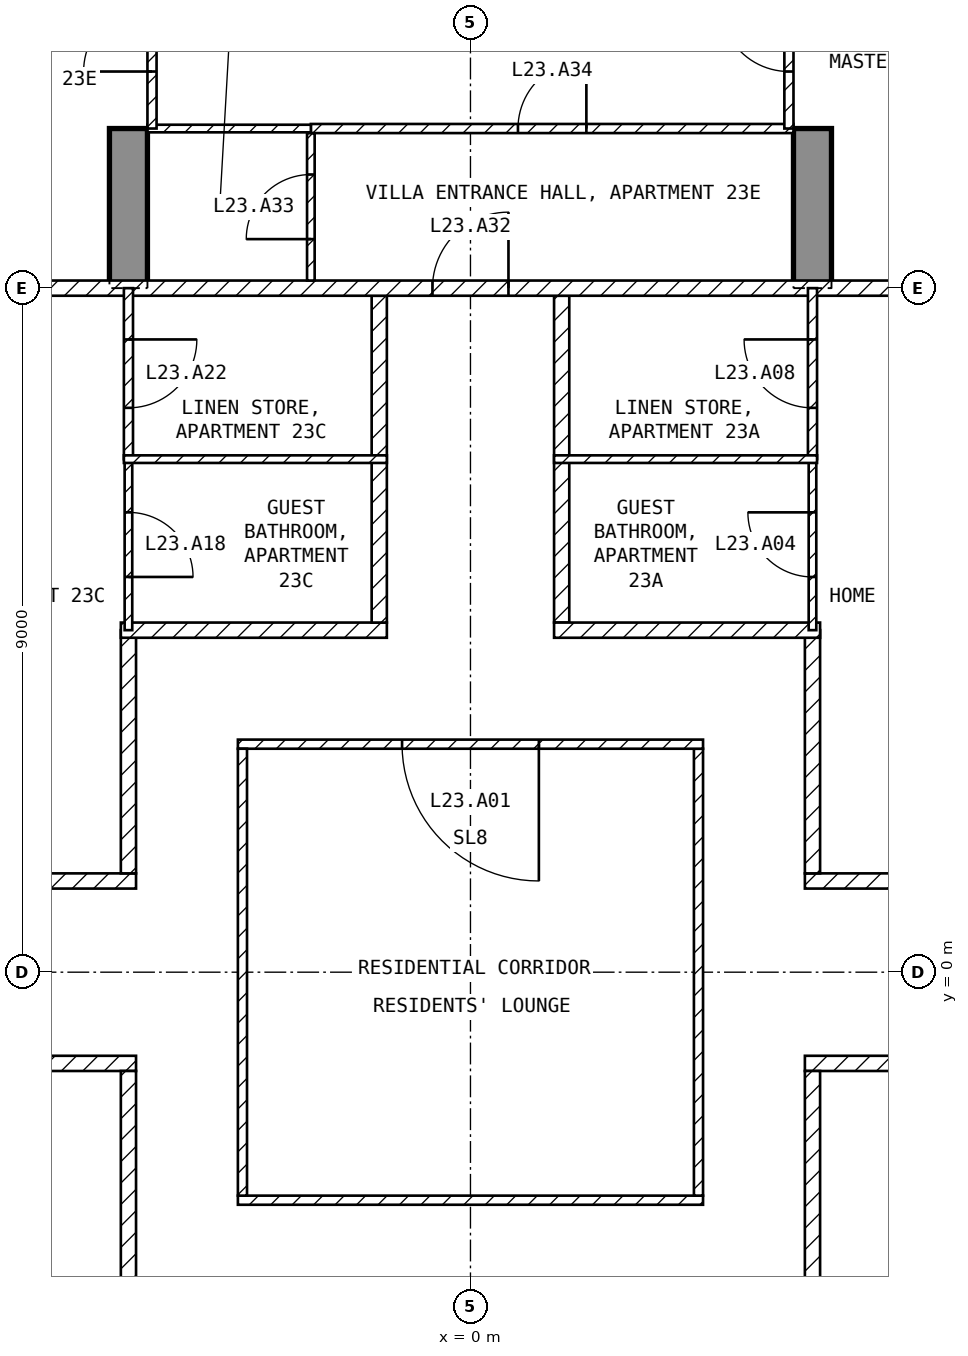
"""IFC4 building model, lengths in metres.
Left out: names, types, materials, properties, quantities, classifications, styles, units other than length and angle.
Written with IfcOpenShell. Run it as: python <this file> out.ifc"""

import sys

from ifc_helpers import new_model, si_unit, direction, frame, frame_2d, origin, place, context, subcontext, project, spatial, polyline, rectangle, outline, extrude, element, fill, save


model = new_model("IFC4")
c1 = context("Model", 3, precision=1e-05, world=origin(), true_north=direction((0.0, 1.0)))
c2 = subcontext(c1, "Body", "Model", "MODEL_VIEW")
j1 = project(units=[si_unit("LENGTHUNIT", "METRE"), si_unit("PLANEANGLEUNIT", "RADIAN")], contexts=[c1])
p1 = place(None, origin())
s1 = spatial("IfcSite", under=j1, at=p1, CompositionType="ELEMENT")
p2 = place(p1, origin())
s2 = spatial("IfcBuilding", under=s1, at=p2, CompositionType="ELEMENT")
p3 = place(p2, frame((0.0, 0.0, 102.4)))
s3 = spatial("IfcBuildingStorey", under=s2, at=p3, CompositionType="ELEMENT", Elevation=102.4)
for number, where, z_axis, x_axis in (
    (1, (-4.75, 9.0, -0.25), (1.0, 0.0, 0.0), (0.0, 1.0, 0.0)),
    (2, (4.25, 9.0, -0.25), (1.0, 0.0, 0.0), (0.0, 1.0, 0.0)),
):
    element("IfcWall", number, at=place(p3, frame(where, z_axis=z_axis, x_axis=x_axis)), inside=s3, PredefinedType="SHEAR", context=c2, shape_type="SweptSolid", body=[
        extrude(outline(polyline([(0.0, 0.0), (2.1, 0.0), (2.1, 2.65), (4.5, 2.65), (4.5, 0.0), (9.9, 0.0), (9.9, 2.65), (12.3, 2.65), (12.3, 0.0), (16.55, 0.0), (16.55, 3.5), (0.0, 3.5), (0.0, 0.0)])), origin(), (0.0, 0.0, 1.0), 0.5),
    ])
p4 = place(p3, frame((-3.06, -3.0, 0.0), z_axis=(0.0, 0.0, 1.0), x_axis=(1.0, 0.0, 0.0)))
e3 = element("IfcWall", 3, at=p4, inside=s3, PredefinedType="PARTITIONING", context=c2, shape_type="SweptSolid", body=[
    extrude(rectangle(XDim=6.12, YDim=0.12, at=frame_2d((3.06, 0.0))), origin(), (0.0, 0.0, 1.0), 3.25),
])
p5 = place(p3, frame((3.0, -2.94, 0.0), z_axis=(0.0, 0.0, 1.0), x_axis=(0.0, 1.0, 0.0)))
e4 = element("IfcWall", 4, at=p5, inside=s3, PredefinedType="PARTITIONING", context=c2, shape_type="SweptSolid", body=[
    extrude(rectangle(XDim=5.88, YDim=0.12, at=frame_2d((2.94, 0.0))), origin(), (0.0, 0.0, 1.0), 3.25),
])
p6 = place(p3, frame((3.06, 3.0, 0.0), z_axis=(0.0, 0.0, 1.0), x_axis=(-1.0, 0.0, 0.0)))
e5 = element("IfcWall", 5, at=p6, inside=s3, PredefinedType="PARTITIONING", context=c2, shape_type="SweptSolid", body=[
    extrude(rectangle(XDim=6.12, YDim=0.12, at=frame_2d((3.06, 0.0))), origin(), (0.0, 0.0, 1.0), 3.25),
])
p7 = place(p6, frame((2.16, 0.0, 0.0)))
e6 = element("IfcOpeningElement", 6, at=p7, cuts=e5, PredefinedType="OPENING", context=c2, shape_type="SweptSolid", body=[
    extrude(rectangle(XDim=1.8, YDim=2.1, at=frame_2d((0.9, 1.05))), frame((0.0, 0.07, 0.0), z_axis=(0.0, -1.0, 0.0), x_axis=(1.0, 0.0, 0.0)), (0.0, 0.0, 1.0), 0.14),
])
p8 = place(p3, frame((-3.0, 2.94, 0.0), z_axis=(0.0, 0.0, 1.0), x_axis=(0.0, -1.0, 0.0)))
e7 = element("IfcWall", 7, at=p8, inside=s3, PredefinedType="PARTITIONING", context=c2, shape_type="SweptSolid", body=[
    extrude(rectangle(XDim=5.88, YDim=0.12, at=frame_2d((2.94, 0.0))), origin(), (0.0, 0.0, 1.0), 3.25),
])
p9 = place(p3, frame((4.4, 1.2, 0.0), z_axis=(0.0, 0.0, 1.0), x_axis=(1.0, 0.0, 0.0)))
e8 = element("IfcWall", 8, at=p9, inside=s3, PredefinedType="PARTITIONING", context=c2, shape_type="SweptSolid", body=[
    extrude(rectangle(XDim=17.2, YDim=0.2, at=frame_2d((8.6, 0.0))), origin(), (0.0, 0.0, 1.0), 3.25),
])
p10 = place(p9, frame((5.9, 0.0, 0.0)))
e9 = element("IfcOpeningElement", 9, at=p10, cuts=e8, PredefinedType="OPENING", context=c2, shape_type="SweptSolid", body=[
    extrude(rectangle(XDim=1.0, YDim=2.1, at=frame_2d((0.5, 1.05))), frame((0.0, 0.11, 0.0), z_axis=(0.0, -1.0, 0.0), x_axis=(1.0, 0.0, 0.0)), (0.0, 0.0, 1.0), 0.22),
])
p11 = place(p3, frame((4.5, 4.5, 0.0), z_axis=(0.0, 0.0, 1.0), x_axis=(0.0, -1.0, 0.0)))
e10 = element("IfcWall", 10, at=p11, inside=s3, PredefinedType="PARTITIONING", context=c2, shape_type="SweptSolid", body=[
    extrude(rectangle(XDim=3.2, YDim=0.2, at=frame_2d((1.6, 0.0))), origin(), (0.0, 0.0, 1.0), 3.25),
])
p12 = place(p3, frame((1.2, 8.9, 0.0), z_axis=(0.0, 0.0, 1.0), x_axis=(0.0, -1.0, 0.0)))
e11 = element("IfcWall", 11, at=p12, inside=s3, PredefinedType="PARTITIONING", context=c2, shape_type="SweptSolid", body=[
    extrude(rectangle(XDim=4.3, YDim=0.2, at=frame_2d((2.15, 0.0))), origin(), (0.0, 0.0, 1.0), 3.25),
])
p13 = place(p3, frame((1.1, 4.5, 0.0), z_axis=(0.0, 0.0, 1.0), x_axis=(1.0, 0.0, 0.0)))
e12 = element("IfcWall", 12, at=p13, inside=s3, PredefinedType="PARTITIONING", context=c2, shape_type="SweptSolid", body=[
    extrude(rectangle(XDim=3.5, YDim=0.2, at=frame_2d((1.75, 0.0))), origin(), (0.0, 0.0, 1.0), 3.25),
])
p14 = place(p3, frame((21.6, -1.2, 0.0), z_axis=(0.0, 0.0, 1.0), x_axis=(-1.0, 0.0, 0.0)))
e13 = element("IfcWall", 13, at=p14, inside=s3, PredefinedType="PARTITIONING", context=c2, shape_type="SweptSolid", body=[
    extrude(rectangle(XDim=17.2, YDim=0.2, at=frame_2d((8.6, 0.0))), origin(), (0.0, 0.0, 1.0), 3.25),
])
p15 = place(p14, frame((3.85, 0.0, 0.0)))
e14 = element("IfcOpeningElement", 14, at=p15, cuts=e13, PredefinedType="OPENING", context=c2, shape_type="SweptSolid", body=[
    extrude(rectangle(XDim=1.0, YDim=2.1, at=frame_2d((0.5, 1.05))), frame((0.0, 0.11, 0.0), z_axis=(0.0, -1.0, 0.0), x_axis=(1.0, 0.0, 0.0)), (0.0, 0.0, 1.0), 0.22),
])
p16 = place(p3, frame((4.5, -1.3, 0.0), z_axis=(0.0, 0.0, 1.0), x_axis=(0.0, -1.0, 0.0)))
e15 = element("IfcWall", 15, at=p16, inside=s3, PredefinedType="PARTITIONING", context=c2, shape_type="SweptSolid", body=[
    extrude(rectangle(XDim=3.2, YDim=0.2, at=frame_2d((1.6, 0.0))), origin(), (0.0, 0.0, 1.0), 3.25),
])
p17 = place(p3, frame((-21.6, 1.2, 0.0), z_axis=(0.0, 0.0, 1.0), x_axis=(1.0, 0.0, 0.0)))
e16 = element("IfcWall", 16, at=p17, inside=s3, PredefinedType="PARTITIONING", context=c2, shape_type="SweptSolid", body=[
    extrude(rectangle(XDim=17.2, YDim=0.2, at=frame_2d((8.6, 0.0))), origin(), (0.0, 0.0, 1.0), 3.25),
])
p18 = place(p17, frame((6.1, 0.0, 0.0)))
e17 = element("IfcOpeningElement", 17, at=p18, cuts=e16, PredefinedType="OPENING", context=c2, shape_type="SweptSolid", body=[
    extrude(rectangle(XDim=1.0, YDim=2.1, at=frame_2d((0.5, 1.05))), frame((0.0, 0.11, 0.0), z_axis=(0.0, -1.0, 0.0), x_axis=(1.0, 0.0, 0.0)), (0.0, 0.0, 1.0), 0.22),
])
p19 = place(p3, frame((-4.5, 1.3, 0.0), z_axis=(0.0, 0.0, 1.0), x_axis=(0.0, 1.0, 0.0)))
e18 = element("IfcWall", 18, at=p19, inside=s3, PredefinedType="PARTITIONING", context=c2, shape_type="SweptSolid", body=[
    extrude(rectangle(XDim=3.2, YDim=0.2, at=frame_2d((1.6, 0.0))), origin(), (0.0, 0.0, 1.0), 3.25),
])
p20 = place(p3, frame((-4.6, 4.5, 0.0), z_axis=(0.0, 0.0, 1.0), x_axis=(1.0, 0.0, 0.0)))
e19 = element("IfcWall", 19, at=p20, inside=s3, PredefinedType="PARTITIONING", context=c2, shape_type="SweptSolid", body=[
    extrude(rectangle(XDim=3.5, YDim=0.2, at=frame_2d((1.75, 0.0))), origin(), (0.0, 0.0, 1.0), 3.25),
])
p21 = place(p3, frame((-1.2, 4.6, 0.0), z_axis=(0.0, 0.0, 1.0), x_axis=(0.0, 1.0, 0.0)))
e20 = element("IfcWall", 20, at=p21, inside=s3, PredefinedType="PARTITIONING", context=c2, shape_type="SweptSolid", body=[
    extrude(rectangle(XDim=4.3, YDim=0.2, at=frame_2d((2.15, 0.0))), origin(), (0.0, 0.0, 1.0), 3.25),
])
p22 = place(p3, frame((-4.4, -1.2, 0.0), z_axis=(0.0, 0.0, 1.0), x_axis=(-1.0, 0.0, 0.0)))
e21 = element("IfcWall", 21, at=p22, inside=s3, PredefinedType="PARTITIONING", context=c2, shape_type="SweptSolid", body=[
    extrude(rectangle(XDim=17.2, YDim=0.2, at=frame_2d((8.6, 0.0))), origin(), (0.0, 0.0, 1.0), 3.25),
])
p23 = place(p22, frame((8.3, 0.0, 0.0)))
e22 = element("IfcOpeningElement", 22, at=p23, cuts=e21, PredefinedType="OPENING", context=c2, shape_type="SweptSolid", body=[
    extrude(rectangle(XDim=1.0, YDim=2.1, at=frame_2d((0.5, 1.05))), frame((0.0, 0.11, 0.0), z_axis=(0.0, -1.0, 0.0), x_axis=(1.0, 0.0, 0.0)), (0.0, 0.0, 1.0), 0.22),
])
p24 = place(p3, frame((-4.5, -4.5, 0.0), z_axis=(0.0, 0.0, 1.0), x_axis=(0.0, 1.0, 0.0)))
e23 = element("IfcWall", 23, at=p24, inside=s3, PredefinedType="PARTITIONING", context=c2, shape_type="SweptSolid", body=[
    extrude(rectangle(XDim=3.2, YDim=0.2, at=frame_2d((1.6, 0.0))), origin(), (0.0, 0.0, 1.0), 3.25),
])
p25 = place(p3, frame((-8.92, 9.0, 0.0), z_axis=(0.0, 0.0, 1.0), x_axis=(1.0, 0.0, 0.0)))
e24 = element("IfcWall", 24, at=p25, inside=s3, PredefinedType="PARTITIONING", context=c2, shape_type="SweptSolid", body=[
    extrude(rectangle(XDim=17.84, YDim=0.2, at=frame_2d((8.92, 0.0))), origin(), (0.0, 0.0, 1.0), 3.25),
])
p26 = place(p25, frame((8.42, 0.0, 0.0)))
e25 = element("IfcOpeningElement", 25, at=p26, cuts=e24, PredefinedType="OPENING", context=c2, shape_type="SweptSolid", body=[
    extrude(rectangle(XDim=1.0, YDim=2.1, at=frame_2d((0.5, 1.05))), frame((0.0, 0.11, 0.0), z_axis=(0.0, -1.0, 0.0), x_axis=(1.0, 0.0, 0.0)), (0.0, 0.0, 1.0), 0.22),
])
p27 = place(p3, frame((4.5, 4.5, 0.0), z_axis=(0.0, 0.0, 1.0), x_axis=(0.0, 1.0, 0.0)))
e26 = element("IfcWall", 26, at=p27, inside=s3, PredefinedType="PARTITIONING", context=c2, shape_type="SweptSolid", body=[
    extrude(rectangle(XDim=2.25, YDim=0.1, at=frame_2d((1.125, 0.0))), origin(), (0.0, 0.0, 1.0), 3.25),
])
p28 = place(p27, frame((0.7, 0.0, 0.0)))
e27 = element("IfcOpeningElement", 27, at=p28, cuts=e26, PredefinedType="OPENING", context=c2, shape_type="SweptSolid", body=[
    extrude(rectangle(XDim=0.85, YDim=2.1, at=frame_2d((0.425, 1.05))), frame((0.0, 0.06, 0.0), z_axis=(0.0, -1.0, 0.0), x_axis=(1.0, 0.0, 0.0)), (0.0, 0.0, 1.0), 0.12),
])
p29 = place(p3, frame((4.5, 6.75, 0.0), z_axis=(0.0, 0.0, 1.0), x_axis=(0.0, 1.0, 0.0)))
e28 = element("IfcWall", 28, at=p29, inside=s3, PredefinedType="PARTITIONING", context=c2, shape_type="SweptSolid", body=[
    extrude(rectangle(XDim=2.25, YDim=0.12, at=frame_2d((1.125, 0.0))), origin(), (0.0, 0.0, 1.0), 3.25),
])
p30 = place(p29, frame((0.675, 0.0, 0.0)))
e29 = element("IfcOpeningElement", 29, at=p30, cuts=e28, PredefinedType="OPENING", context=c2, shape_type="SweptSolid", body=[
    extrude(rectangle(XDim=0.9, YDim=2.1, at=frame_2d((0.45, 1.05))), frame((0.0, 0.07, 0.0), z_axis=(0.0, -1.0, 0.0), x_axis=(1.0, 0.0, 0.0)), (0.0, 0.0, 1.0), 0.14),
])
p31 = place(p3, frame((1.1, 6.75, 0.0), z_axis=(0.0, 0.0, 1.0), x_axis=(1.0, 0.0, 0.0)))
e30 = element("IfcWall", 30, at=p31, inside=s3, PredefinedType="PARTITIONING", context=c2, shape_type="SweptSolid", body=[
    extrude(rectangle(XDim=3.46, YDim=0.1, at=frame_2d((1.73, 0.0))), origin(), (0.0, 0.0, 1.0), 3.25),
])
p32 = place(p3, frame((-4.5, 6.75, 0.0), z_axis=(0.0, 0.0, 1.0), x_axis=(0.0, -1.0, 0.0)))
e31 = element("IfcWall", 31, at=p32, inside=s3, PredefinedType="PARTITIONING", context=c2, shape_type="SweptSolid", body=[
    extrude(rectangle(XDim=2.25, YDim=0.1, at=frame_2d((1.125, 0.0))), origin(), (0.0, 0.0, 1.0), 3.25),
])
p33 = place(p32, frame((0.7, 0.0, 0.0)))
e32 = element("IfcOpeningElement", 32, at=p33, cuts=e31, PredefinedType="OPENING", context=c2, shape_type="SweptSolid", body=[
    extrude(rectangle(XDim=0.85, YDim=2.1, at=frame_2d((0.425, 1.05))), frame((0.0, 0.06, 0.0), z_axis=(0.0, -1.0, 0.0), x_axis=(1.0, 0.0, 0.0)), (0.0, 0.0, 1.0), 0.12),
])
p34 = place(p3, frame((-4.5, 9.0, 0.0), z_axis=(0.0, 0.0, 1.0), x_axis=(0.0, -1.0, 0.0)))
e33 = element("IfcWall", 33, at=p34, inside=s3, PredefinedType="PARTITIONING", context=c2, shape_type="SweptSolid", body=[
    extrude(rectangle(XDim=2.25, YDim=0.12, at=frame_2d((1.125, 0.0))), origin(), (0.0, 0.0, 1.0), 3.25),
])
p35 = place(p34, frame((0.675, 0.0, 0.0)))
e34 = element("IfcOpeningElement", 34, at=p35, cuts=e33, PredefinedType="OPENING", context=c2, shape_type="SweptSolid", body=[
    extrude(rectangle(XDim=0.9, YDim=2.1, at=frame_2d((0.45, 1.05))), frame((0.0, 0.07, 0.0), z_axis=(0.0, -1.0, 0.0), x_axis=(1.0, 0.0, 0.0)), (0.0, 0.0, 1.0), 0.14),
])
p36 = place(p3, frame((-4.56, 6.75, 0.0), z_axis=(0.0, 0.0, 1.0), x_axis=(1.0, 0.0, 0.0)))
e35 = element("IfcWall", 35, at=p36, inside=s3, PredefinedType="PARTITIONING", context=c2, shape_type="SweptSolid", body=[
    extrude(rectangle(XDim=3.46, YDim=0.1, at=frame_2d((1.73, 0.0))), origin(), (0.0, 0.0, 1.0), 3.25),
])
p37 = place(p3, frame((-2.1, 9.1, 0.0), z_axis=(0.0, 0.0, 1.0), x_axis=(0.0, 1.0, 0.0)))
e36 = element("IfcWall", 36, at=p37, inside=s3, PredefinedType="PARTITIONING", context=c2, shape_type="SweptSolid", body=[
    extrude(rectangle(XDim=1.94, YDim=0.1, at=frame_2d((0.97, 0.0))), origin(), (0.0, 0.0, 1.0), 3.25),
])
p38 = place(p37, frame((0.545, 0.0, 0.0)))
e37 = element("IfcOpeningElement", 37, at=p38, cuts=e36, PredefinedType="OPENING", context=c2, shape_type="SweptSolid", body=[
    extrude(rectangle(XDim=0.85, YDim=2.1, at=frame_2d((0.425, 1.05))), frame((0.0, 0.06, 0.0), z_axis=(0.0, -1.0, 0.0), x_axis=(1.0, 0.0, 0.0)), (0.0, 0.0, 1.0), 0.12),
])
p39 = place(p3, frame((-2.1, 11.1, 0.0), z_axis=(0.0, 0.0, 1.0), x_axis=(1.0, 0.0, 0.0)))
e38 = element("IfcWall", 38, at=p39, inside=s3, PredefinedType="PARTITIONING", context=c2, shape_type="SweptSolid", body=[
    extrude(rectangle(XDim=6.35, YDim=0.12, at=frame_2d((3.175, 0.0))), origin(), (0.0, 0.0, 1.0), 3.25),
])
p40 = place(p39, frame((2.725, 0.0, 0.0)))
e39 = element("IfcOpeningElement", 39, at=p40, cuts=e38, PredefinedType="OPENING", context=c2, shape_type="SweptSolid", body=[
    extrude(rectangle(XDim=0.9, YDim=2.1, at=frame_2d((0.45, 1.05))), frame((0.0, 0.07, 0.0), z_axis=(0.0, -1.0, 0.0), x_axis=(1.0, 0.0, 0.0)), (0.0, 0.0, 1.0), 0.14),
])
p41 = place(p3, frame((-4.25, 11.1, 0.0), z_axis=(0.0, 0.0, 1.0), x_axis=(1.0, 0.0, 0.0)))
e40 = element("IfcWall", 40, at=p41, inside=s3, PredefinedType="PARTITIONING", context=c2, shape_type="SweptSolid", body=[
    extrude(rectangle(XDim=2.15, YDim=0.1, at=frame_2d((1.075, 0.0))), origin(), (0.0, 0.0, 1.0), 3.25),
])
p42 = place(p3, frame((4.19, 11.1, 0.0), z_axis=(0.0, 0.0, 1.0), x_axis=(0.0, 1.0, 0.0)))
e41 = element("IfcWall", 41, at=p42, inside=s3, PredefinedType="PARTITIONING", context=c2, shape_type="SweptSolid", body=[
    extrude(rectangle(XDim=2.4, YDim=0.12, at=frame_2d((1.2, 0.0))), origin(), (0.0, 0.0, 1.0), 2.4),
])
p43 = place(p42, frame((0.75, 0.0, 0.0)))
e42 = element("IfcOpeningElement", 42, at=p43, cuts=e41, PredefinedType="OPENING", context=c2, shape_type="SweptSolid", body=[
    extrude(rectangle(XDim=0.9, YDim=2.1, at=frame_2d((0.45, 1.05))), frame((0.0, 0.07, 0.0), z_axis=(0.0, -1.0, 0.0), x_axis=(1.0, 0.0, 0.0)), (0.0, 0.0, 1.0), 0.14),
])
p44 = place(p3, frame((-4.19, 11.1, 0.0), z_axis=(0.0, 0.0, 1.0), x_axis=(0.0, 1.0, 0.0)))
e43 = element("IfcWall", 43, at=p44, inside=s3, PredefinedType="PARTITIONING", context=c2, shape_type="SweptSolid", body=[
    extrude(rectangle(XDim=2.4, YDim=0.12, at=frame_2d((1.2, 0.0))), origin(), (0.0, 0.0, 1.0), 2.4),
])
p45 = place(p44, frame((0.75, 0.0, 0.0)))
e44 = element("IfcOpeningElement", 44, at=p45, cuts=e43, PredefinedType="OPENING", context=c2, shape_type="SweptSolid", body=[
    extrude(rectangle(XDim=0.9, YDim=2.1, at=frame_2d((0.45, 1.05))), frame((0.0, 0.07, 0.0), z_axis=(0.0, -1.0, 0.0), x_axis=(1.0, 0.0, 0.0)), (0.0, 0.0, 1.0), 0.14),
])
p46 = place(p7, origin())
e45 = element("IfcDoor", 45, at=p46, inside=s3, OperationType="SINGLE_SWING_LEFT", PredefinedType="DOOR", context=c2, shape_type="SweptSolid", body=[
    extrude(rectangle(XDim=1.8, YDim=2.1, at=frame_2d((0.9, 1.05))), frame((0.0, 0.025, 0.0), z_axis=(0.0, -1.0, 0.0), x_axis=(1.0, 0.0, 0.0)), (0.0, 0.0, 1.0), 0.05),
])
fill(e6, e45)
p47 = place(p28, origin())
e46 = element("IfcDoor", 46, at=p47, inside=s3, OperationType="SINGLE_SWING_RIGHT", PredefinedType="DOOR", context=c2, shape_type="SweptSolid", body=[
    extrude(rectangle(XDim=0.85, YDim=2.1, at=frame_2d((0.425, 1.05))), frame((0.0, 0.025, 0.0), z_axis=(0.0, -1.0, 0.0), x_axis=(1.0, 0.0, 0.0)), (0.0, 0.0, 1.0), 0.05),
])
fill(e27, e46)
p48 = place(p30, origin())
e47 = element("IfcDoor", 47, at=p48, inside=s3, OperationType="SINGLE_SWING_RIGHT", PredefinedType="DOOR", context=c2, shape_type="SweptSolid", body=[
    extrude(rectangle(XDim=0.9, YDim=2.1, at=frame_2d((0.45, 1.05))), frame((0.0, 0.025, 0.0), z_axis=(0.0, -1.0, 0.0), x_axis=(1.0, 0.0, 0.0)), (0.0, 0.0, 1.0), 0.05),
])
fill(e29, e47)
p49 = place(p33, origin())
e48 = element("IfcDoor", 48, at=p49, inside=s3, OperationType="SINGLE_SWING_RIGHT", PredefinedType="DOOR", context=c2, shape_type="SweptSolid", body=[
    extrude(rectangle(XDim=0.85, YDim=2.1, at=frame_2d((0.425, 1.05))), frame((0.0, 0.025, 0.0), z_axis=(0.0, -1.0, 0.0), x_axis=(1.0, 0.0, 0.0)), (0.0, 0.0, 1.0), 0.05),
])
fill(e32, e48)
p50 = place(p35, origin())
e49 = element("IfcDoor", 49, at=p50, inside=s3, OperationType="SINGLE_SWING_LEFT", PredefinedType="DOOR", context=c2, shape_type="SweptSolid", body=[
    extrude(rectangle(XDim=0.9, YDim=2.1, at=frame_2d((0.45, 1.05))), frame((0.0, 0.025, 0.0), z_axis=(0.0, -1.0, 0.0), x_axis=(1.0, 0.0, 0.0)), (0.0, 0.0, 1.0), 0.05),
])
fill(e34, e49)
p51 = place(p26, origin())
e50 = element("IfcDoor", 50, at=p51, inside=s3, OperationType="SINGLE_SWING_RIGHT", PredefinedType="DOOR", context=c2, shape_type="SweptSolid", body=[
    extrude(rectangle(XDim=1.0, YDim=2.1, at=frame_2d((0.5, 1.05))), frame((0.0, 0.025, 0.0), z_axis=(0.0, -1.0, 0.0), x_axis=(1.0, 0.0, 0.0)), (0.0, 0.0, 1.0), 0.05),
])
fill(e25, e50)
p52 = place(p38, origin())
e51 = element("IfcDoor", 51, at=p52, inside=s3, OperationType="SINGLE_SWING_LEFT", PredefinedType="DOOR", context=c2, shape_type="SweptSolid", body=[
    extrude(rectangle(XDim=0.85, YDim=2.1, at=frame_2d((0.425, 1.05))), frame((0.0, 0.025, 0.0), z_axis=(0.0, -1.0, 0.0), x_axis=(1.0, 0.0, 0.0)), (0.0, 0.0, 1.0), 0.05),
])
fill(e37, e51)
p53 = place(p40, origin())
e52 = element("IfcDoor", 52, at=p53, inside=s3, OperationType="SINGLE_SWING_RIGHT", PredefinedType="DOOR", context=c2, shape_type="SweptSolid", body=[
    extrude(rectangle(XDim=0.9, YDim=2.1, at=frame_2d((0.45, 1.05))), frame((0.0, 0.025, 0.0), z_axis=(0.0, -1.0, 0.0), x_axis=(1.0, 0.0, 0.0)), (0.0, 0.0, 1.0), 0.05),
])
fill(e39, e52)
p54 = place(p43, origin())
e53 = element("IfcDoor", 53, at=p54, inside=s3, OperationType="SINGLE_SWING_RIGHT", PredefinedType="DOOR", context=c2, shape_type="SweptSolid", body=[
    extrude(rectangle(XDim=0.9, YDim=2.1, at=frame_2d((0.45, 1.05))), frame((0.0, 0.025, 0.0), z_axis=(0.0, -1.0, 0.0), x_axis=(1.0, 0.0, 0.0)), (0.0, 0.0, 1.0), 0.05),
])
fill(e42, e53)
p55 = place(p45, origin())
e54 = element("IfcDoor", 54, at=p55, inside=s3, OperationType="SINGLE_SWING_LEFT", PredefinedType="DOOR", context=c2, shape_type="SweptSolid", body=[
    extrude(rectangle(XDim=0.9, YDim=2.1, at=frame_2d((0.45, 1.05))), frame((0.0, 0.025, 0.0), z_axis=(0.0, -1.0, 0.0), x_axis=(1.0, 0.0, 0.0)), (0.0, 0.0, 1.0), 0.05),
])
fill(e44, e54)
save(model, sys.argv[1])
